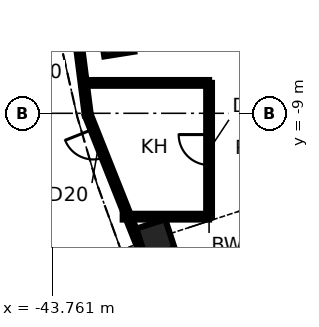
"""IFC4 building model, lengths in metres.
Left out: names, types, materials, properties, quantities, classifications, styles, units other than length and angle.
Written with IfcOpenShell. Run it as: python <this file> out.ifc"""

import sys

from ifc_helpers import new_model, si_unit, direction, frame, frame_2d, origin, origin_2d, place, context, subcontext, project, spatial, rectangle, extrude, element, fill, save


model = new_model("IFC4")
c1 = context("Model", 3, precision=1e-05, world=origin(), true_north=direction((0.0, 1.0)))
c2 = subcontext(c1, "Body", "Model", "MODEL_VIEW")
j1 = project(units=[si_unit("LENGTHUNIT", "METRE"), si_unit("PLANEANGLEUNIT", "RADIAN")], contexts=[c1])
p1 = place(None, origin())
s1 = spatial("IfcSite", under=j1, at=p1, CompositionType="ELEMENT")
p2 = place(p1, origin())
s2 = spatial("IfcBuilding", under=s1, at=p2, CompositionType="ELEMENT")
p3 = place(p2, origin())
s3 = spatial("IfcBuildingStorey", under=s2, at=p3, CompositionType="ELEMENT", Elevation=0.0)
for number, where, z_axis, x_axis in (
    (1, (-41.632, -6.557, 0.0), (0.0, 0.0, 1.0), (-0.988, -0.156, 0.0)),
    (2, (-40.363, -13.115, 0.0), (0.0, 0.0, 1.0), (-0.951, -0.309, 0.0)),
):
    element("IfcColumn", number, at=place(p3, frame(where, z_axis=z_axis, x_axis=x_axis)), inside=s3, PredefinedType="COLUMN", context=c2, shape_type="SweptSolid", body=[
        extrude(rectangle(XDim=1.0, YDim=1.0, at=origin_2d()), origin(), (0.0, 0.0, 1.0), 5.6),
    ])
p4 = place(p3, frame((-43.75, 0.0, 0.0), z_axis=(0.0, 0.0, 1.0), x_axis=(0.127063093957, -0.991894636619, 0.0)))
e3 = element("IfcWall", 3, at=p4, inside=s3, PredefinedType="SOLIDWALL", context=c2, shape_type="SweptSolid", body=[
    extrude(rectangle(XDim=9.127, YDim=0.2, at=frame_2d((4.563, 0.0))), origin(), (0.0, 0.0, 1.0), 5.4),
])
p5 = place(p4, frame((2.609, 0.0, 0.0)))
e4 = element("IfcOpeningElement", 4, at=p5, cuts=e3, PredefinedType="OPENING", context=c2, shape_type="SweptSolid", body=[
    extrude(rectangle(XDim=1.8, YDim=2.7, at=frame_2d((0.9, 1.35))), frame((0.0, 0.11, 0.0), z_axis=(0.0, -1.0, 0.0), x_axis=(1.0, 0.0, 0.0)), (0.0, 0.0, 1.0), 0.22),
])
p6 = place(p4, frame((1.209, 0.0, 0.3)))
e5 = element("IfcOpeningElement", 5, at=p6, cuts=e3, PredefinedType="OPENING", context=c2, shape_type="SweptSolid", body=[
    extrude(rectangle(XDim=1.2, YDim=2.4, at=frame_2d((0.6, 1.2))), frame((0.0, 0.11, 0.0), z_axis=(0.0, -1.0, 0.0), x_axis=(1.0, 0.0, 0.0)), (0.0, 0.0, 1.0), 0.22),
])
p7 = place(p4, frame((4.609, 0.0, 0.3)))
e6 = element("IfcOpeningElement", 6, at=p7, cuts=e3, PredefinedType="OPENING", context=c2, shape_type="SweptSolid", body=[
    extrude(rectangle(XDim=1.2, YDim=2.4, at=frame_2d((0.6, 1.2))), frame((0.0, 0.11, 0.0), z_axis=(0.0, -1.0, 0.0), x_axis=(1.0, 0.0, 0.0)), (0.0, 0.0, 1.0), 0.22),
])
p8 = place(p4, frame((2.609, 0.0, 3.0)))
e7 = element("IfcOpeningElement", 7, at=p8, cuts=e3, PredefinedType="OPENING", context=c2, shape_type="SweptSolid", body=[
    extrude(rectangle(XDim=1.8, YDim=0.9, at=frame_2d((0.9, 0.45))), frame((0.0, 0.11, 0.0), z_axis=(0.0, -1.0, 0.0), x_axis=(1.0, 0.0, 0.0)), (0.0, 0.0, 1.0), 0.22),
])
p9 = place(p3, frame((-42.59, -9.053, 0.0), z_axis=(0.0, 0.0, 1.0), x_axis=(0.369754749145, -0.929129391143, 0.0)))
e8 = element("IfcWall", 8, at=p9, inside=s3, PredefinedType="SOLIDWALL", context=c2, shape_type="SweptSolid", body=[
    extrude(rectangle(XDim=9.06, YDim=0.2, at=frame_2d((4.53, 0.0))), origin(), (0.0, 0.0, 1.0), 5.4),
])
p10 = place(p9, frame((0.501, 0.0, 0.0)))
e9 = element("IfcOpeningElement", 9, at=p10, cuts=e8, PredefinedType="OPENING", context=c2, shape_type="SweptSolid", body=[
    extrude(rectangle(XDim=1.0, YDim=2.1, at=frame_2d((0.5, 1.05))), frame((0.0, 0.11, 0.0), z_axis=(0.0, -1.0, 0.0), x_axis=(1.0, 0.0, 0.0)), (0.0, 0.0, 1.0), 0.22),
])
p11 = place(p3, frame((-38.6, -8.0, 0.0), z_axis=(0.0, 0.0, 1.0), x_axis=(-1.0, 0.0, 0.0)))
e10 = element("IfcWall", 10, at=p11, inside=s3, PredefinedType="SOLIDWALL", context=c2, shape_type="SweptSolid", body=[
    extrude(rectangle(XDim=4.147, YDim=0.19, at=frame_2d((2.073, 0.0))), origin(), (0.0, 0.0, 1.0), 5.4),
])
p12 = place(p3, frame((-38.6, -12.4, 0.0), z_axis=(0.0, 0.0, 1.0), x_axis=(0.0, 1.0, 0.0)))
e11 = element("IfcWall", 11, at=p12, inside=s3, PredefinedType="SOLIDWALL", context=c2, shape_type="SweptSolid", body=[
    extrude(rectangle(XDim=4.4, YDim=0.19, at=frame_2d((2.2, 0.0))), origin(), (0.0, 0.0, 1.0), 5.4),
])
p13 = place(p12, frame((1.7, 0.0, 0.0)))
e12 = element("IfcOpeningElement", 12, at=p13, cuts=e11, PredefinedType="OPENING", context=c2, shape_type="SweptSolid", body=[
    extrude(rectangle(XDim=1.0, YDim=2.1, at=frame_2d((0.5, 1.05))), frame((0.0, 0.105, 0.0), z_axis=(0.0, -1.0, 0.0), x_axis=(1.0, 0.0, 0.0)), (0.0, 0.0, 1.0), 0.21),
])
p14 = place(p3, frame((-41.442, -12.4, 0.0), z_axis=(0.0, 0.0, 1.0), x_axis=(1.0, 0.0, 0.0)))
e13 = element("IfcWall", 13, at=p14, inside=s3, PredefinedType="SOLIDWALL", context=c2, shape_type="SweptSolid", body=[
    extrude(rectangle(XDim=2.842, YDim=0.19, at=frame_2d((1.421, 0.0))), origin(), (0.0, 0.0, 1.0), 5.4),
])
p15 = place(p10, frame((1.0, 0.0, 0.0), z_axis=(0.0, 0.0, 1.0), x_axis=(-1.0, 0.0, 0.0)))
e14 = element("IfcDoor", 14, at=p15, inside=s3, OperationType="SINGLE_SWING_RIGHT", PredefinedType="DOOR", context=c2, shape_type="SweptSolid", body=[
    extrude(rectangle(XDim=1.0, YDim=2.1, at=frame_2d((0.5, 1.05))), frame((0.0, 0.025, 0.0), z_axis=(0.0, -1.0, 0.0), x_axis=(1.0, 0.0, 0.0)), (0.0, 0.0, 1.0), 0.05),
])
fill(e9, e14)
p16 = place(p13, origin())
e15 = element("IfcDoor", 15, at=p16, inside=s3, OperationType="SINGLE_SWING_RIGHT", PredefinedType="DOOR", context=c2, shape_type="SweptSolid", body=[
    extrude(rectangle(XDim=1.0, YDim=2.1, at=frame_2d((0.5, 1.05))), frame((0.0, 0.025, 0.0), z_axis=(0.0, -1.0, 0.0), x_axis=(1.0, 0.0, 0.0)), (0.0, 0.0, 1.0), 0.05),
])
fill(e12, e15)
save(model, sys.argv[1])
